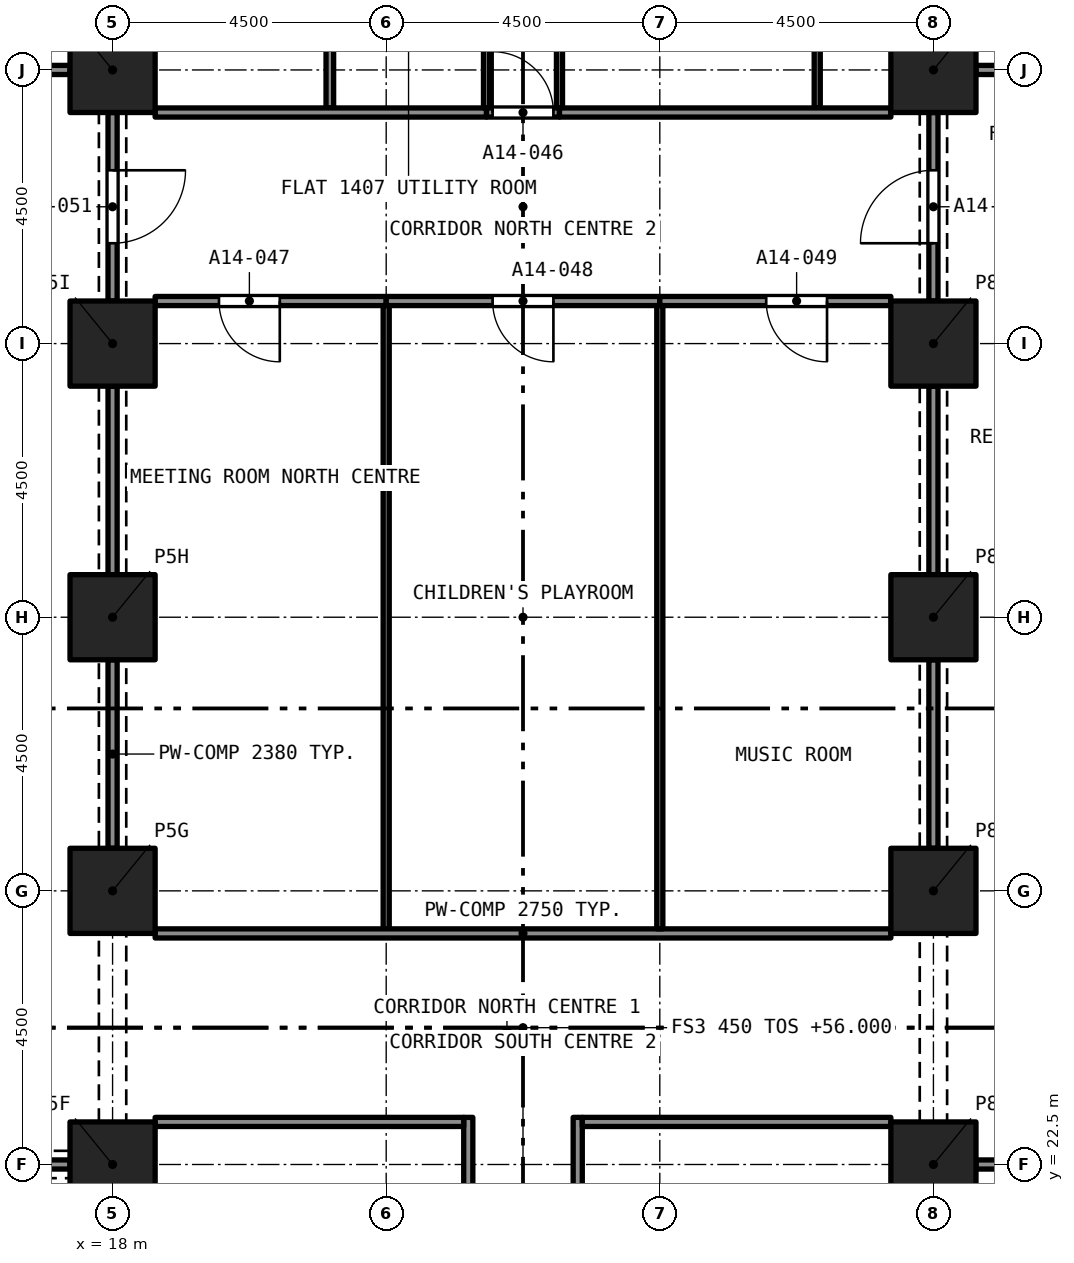
"""IFC4 building model, lengths in metres.
Left out: names, types, materials, properties, quantities, classifications, styles, units other than length and angle.
Written with IfcOpenShell. Run it as: python <this file> out.ifc"""

import sys

from ifc_helpers import new_model, si_unit, direction, frame, frame_2d, origin, origin_2d, place, context, subcontext, project, spatial, rectangle, extrude, element, fill, save


model = new_model("IFC4")
c1 = context("Model", 3, precision=1e-05, world=origin(), true_north=direction((0.0, 1.0)))
c2 = subcontext(c1, "Body", "Model", "MODEL_VIEW")
j1 = project(units=[si_unit("LENGTHUNIT", "METRE"), si_unit("PLANEANGLEUNIT", "RADIAN")], contexts=[c1])
p1 = place(None, origin())
s1 = spatial("IfcSite", under=j1, at=p1, CompositionType="ELEMENT")
p2 = place(p1, origin())
s2 = spatial("IfcBuilding", under=s1, at=p2, CompositionType="ELEMENT")
p3 = place(p2, frame((0.0, 0.0, 56.0)))
s3 = spatial("IfcBuildingStorey", under=s2, at=p3, CompositionType="ELEMENT", Elevation=56.0)
for number, where, z_axis, x_axis in (
    (1, (18.0, 22.5, 0.0), (0.0, 0.0, 1.0), (1.0, 0.0, 0.0)),
    (2, (31.5, 22.5, 0.0), (0.0, 0.0, 1.0), (1.0, 0.0, 0.0)),
    (3, (18.0, 27.0, 0.0), (0.0, 0.0, 1.0), (1.0, 0.0, 0.0)),
    (4, (31.5, 27.0, 0.0), (0.0, 0.0, 1.0), (1.0, 0.0, 0.0)),
    (5, (18.0, 31.5, 0.0), (0.0, 0.0, 1.0), (1.0, 0.0, 0.0)),
    (6, (31.5, 31.5, 0.0), (0.0, 0.0, 1.0), (1.0, 0.0, 0.0)),
    (7, (18.0, 36.0, 0.0), (0.0, 0.0, 1.0), (1.0, 0.0, 0.0)),
    (8, (31.5, 36.0, 0.0), (0.0, 0.0, 1.0), (1.0, 0.0, 0.0)),
    (9, (18.0, 40.5, 0.0), (0.0, 0.0, 1.0), (1.0, 0.0, 0.0)),
    (10, (31.5, 40.5, 0.0), (0.0, 0.0, 1.0), (1.0, 0.0, 0.0)),
):
    element("IfcColumn", number, at=place(p3, frame(where, z_axis=z_axis, x_axis=x_axis)), inside=s3, PredefinedType="COLUMN", context=c2, shape_type="SweptSolid", body=[
        extrude(rectangle(XDim=1.4, YDim=1.4, at=origin_2d()), origin(), (0.0, 0.0, 1.0), 3.2),
    ])
p4 = place(p3, frame((13.5, 40.5, 0.0), z_axis=(0.0, 0.0, 1.0), x_axis=(1.0, 0.0, 0.0)))
e11 = element("IfcWall", 11, at=p4, inside=s3, PredefinedType="PARTITIONING", context=c2, shape_type="SweptSolid", body=[
    extrude(rectangle(XDim=3.8, YDim=0.15, at=frame_2d((1.9, 0.0))), origin(), (0.0, 0.0, 1.0), 2.9),
])
p5 = place(p3, frame((32.2, 40.5, 0.0), z_axis=(0.0, 0.0, 1.0), x_axis=(1.0, 0.0, 0.0)))
e12 = element("IfcWall", 12, at=p5, inside=s3, PredefinedType="PARTITIONING", context=c2, shape_type="SweptSolid", body=[
    extrude(rectangle(XDim=2.15, YDim=0.15, at=frame_2d((1.075, 0.0))), origin(), (0.0, 0.0, 1.0), 2.9),
])
p6 = place(p5, frame((1.02, 0.0, 0.0)))
e13 = element("IfcOpeningElement", 13, at=p6, cuts=e12, PredefinedType="OPENING", context=c2, shape_type="SweptSolid", body=[
    extrude(rectangle(XDim=1.0, YDim=2.1, at=frame_2d((0.5, 1.05))), frame((0.0, 0.085, 0.0), z_axis=(0.0, -1.0, 0.0), x_axis=(1.0, 0.0, 0.0)), (0.0, 0.0, 1.0), 0.17),
])
p7 = place(p3, frame((21.573, 39.875, 0.0), z_axis=(0.0, 0.0, 1.0), x_axis=(0.0, 1.0, 0.0)))
e14 = element("IfcWall", 14, at=p7, inside=s3, PredefinedType="PARTITIONING", context=c2, shape_type="SweptSolid", body=[
    extrude(rectangle(XDim=3.843, YDim=0.125, at=frame_2d((1.921, 0.0))), origin(), (0.0, 0.0, 1.0), 2.75),
])
p8 = place(p3, frame((18.7, 39.8, 0.0), z_axis=(0.0, 0.0, 1.0), x_axis=(1.0, 0.0, 0.0)))
e15 = element("IfcWall", 15, at=p8, inside=s3, PredefinedType="PARTITIONING", context=c2, shape_type="SweptSolid", body=[
    extrude(rectangle(XDim=5.45, YDim=0.15, at=frame_2d((2.725, 0.0))), origin(), (0.0, 0.0, 1.0), 2.75),
])
for number, where, z_axis, x_axis in (
    (16, (25.35, 39.875, 0.0), (0.0, 0.0, 1.0), (0.0, 1.0, 0.0)),
    (17, (24.15, 39.875, 0.0), (0.0, 0.0, 1.0), (0.0, 1.0, 0.0)),
):
    element("IfcWall", number, at=place(p3, frame(where, z_axis=z_axis, x_axis=x_axis)), inside=s3, PredefinedType="PARTITIONING", context=c2, shape_type="SweptSolid", body=[
        extrude(rectangle(XDim=3.855, YDim=0.1, at=frame_2d((1.927, 0.0))), origin(), (0.0, 0.0, 1.0), 2.75),
    ])
p9 = place(p3, frame((24.15, 39.8, 0.0), z_axis=(0.0, 0.0, 1.0), x_axis=(1.0, 0.0, 0.0)))
e18 = element("IfcWall", 18, at=p9, inside=s3, PredefinedType="PARTITIONING", context=c2, shape_type="SweptSolid", body=[
    extrude(rectangle(XDim=1.2, YDim=0.15, at=frame_2d((0.6, 0.0))), origin(), (0.0, 0.0, 1.0), 2.75),
])
p10 = place(p9, frame((0.1, 0.0, 0.0)))
e19 = element("IfcOpeningElement", 19, at=p10, cuts=e18, PredefinedType="OPENING", context=c2, shape_type="SweptSolid", body=[
    extrude(rectangle(XDim=1.0, YDim=2.1, at=frame_2d((0.5, 1.05))), frame((0.0, 0.085, 0.0), z_axis=(0.0, -1.0, 0.0), x_axis=(1.0, 0.0, 0.0)), (0.0, 0.0, 1.0), 0.17),
])
p11 = place(p3, frame((29.589, 39.875, 0.0), z_axis=(0.0, 0.0, 1.0), x_axis=(0.0, 1.0, 0.0)))
e20 = element("IfcWall", 20, at=p11, inside=s3, PredefinedType="PARTITIONING", context=c2, shape_type="SweptSolid", body=[
    extrude(rectangle(XDim=3.855, YDim=0.1, at=frame_2d((1.927, 0.0))), origin(), (0.0, 0.0, 1.0), 2.75),
])
p12 = place(p3, frame((25.35, 39.8, 0.0), z_axis=(0.0, 0.0, 1.0), x_axis=(1.0, 0.0, 0.0)))
e21 = element("IfcWall", 21, at=p12, inside=s3, PredefinedType="PARTITIONING", context=c2, shape_type="SweptSolid", body=[
    extrude(rectangle(XDim=5.45, YDim=0.15, at=frame_2d((2.725, 0.0))), origin(), (0.0, 0.0, 1.0), 2.75),
])
p13 = place(p3, frame((22.5, 36.7, 0.0), z_axis=(0.0, 0.0, 1.0), x_axis=(-1.0, 0.0, 0.0)))
e22 = element("IfcWall", 22, at=p13, inside=s3, PredefinedType="PARTITIONING", context=c2, shape_type="SweptSolid", body=[
    extrude(rectangle(XDim=3.8, YDim=0.15, at=frame_2d((1.9, 0.0))), origin(), (0.0, 0.0, 1.0), 2.75),
])
p14 = place(p13, frame((1.75, 0.0, 0.0)))
e23 = element("IfcOpeningElement", 23, at=p14, cuts=e22, PredefinedType="OPENING", context=c2, shape_type="SweptSolid", body=[
    extrude(rectangle(XDim=1.0, YDim=2.1, at=frame_2d((0.5, 1.05))), frame((0.0, 0.085, 0.0), z_axis=(0.0, -1.0, 0.0), x_axis=(1.0, 0.0, 0.0)), (0.0, 0.0, 1.0), 0.17),
])
p15 = place(p3, frame((27.0, 36.7, 0.0), z_axis=(0.0, 0.0, 1.0), x_axis=(-1.0, 0.0, 0.0)))
e24 = element("IfcWall", 24, at=p15, inside=s3, PredefinedType="PARTITIONING", context=c2, shape_type="SweptSolid", body=[
    extrude(rectangle(XDim=4.5, YDim=0.15, at=frame_2d((2.25, 0.0))), origin(), (0.0, 0.0, 1.0), 2.75),
])
p16 = place(p15, frame((1.75, 0.0, 0.0)))
e25 = element("IfcOpeningElement", 25, at=p16, cuts=e24, PredefinedType="OPENING", context=c2, shape_type="SweptSolid", body=[
    extrude(rectangle(XDim=1.0, YDim=2.1, at=frame_2d((0.5, 1.05))), frame((0.0, 0.085, 0.0), z_axis=(0.0, -1.0, 0.0), x_axis=(1.0, 0.0, 0.0)), (0.0, 0.0, 1.0), 0.17),
])
p17 = place(p3, frame((30.8, 36.7, 0.0), z_axis=(0.0, 0.0, 1.0), x_axis=(-1.0, 0.0, 0.0)))
e26 = element("IfcWall", 26, at=p17, inside=s3, PredefinedType="PARTITIONING", context=c2, shape_type="SweptSolid", body=[
    extrude(rectangle(XDim=3.8, YDim=0.15, at=frame_2d((1.9, 0.0))), origin(), (0.0, 0.0, 1.0), 2.75),
])
p18 = place(p17, frame((1.05, 0.0, 0.0)))
e27 = element("IfcOpeningElement", 27, at=p18, cuts=e26, PredefinedType="OPENING", context=c2, shape_type="SweptSolid", body=[
    extrude(rectangle(XDim=1.0, YDim=2.1, at=frame_2d((0.5, 1.05))), frame((0.0, 0.085, 0.0), z_axis=(0.0, -1.0, 0.0), x_axis=(1.0, 0.0, 0.0)), (0.0, 0.0, 1.0), 0.17),
])
p19 = place(p3, frame((31.5, 36.7, 0.0), z_axis=(0.0, 0.0, 1.0), x_axis=(0.0, 1.0, 0.0)))
e28 = element("IfcWall", 28, at=p19, inside=s3, PredefinedType="PARTITIONING", context=c2, shape_type="SweptSolid", body=[
    extrude(rectangle(XDim=3.1, YDim=0.15, at=frame_2d((1.55, 0.0))), origin(), (0.0, 0.0, 1.0), 2.38),
])
p20 = place(p19, frame((0.95, 0.0, 0.0)))
e29 = element("IfcOpeningElement", 29, at=p20, cuts=e28, PredefinedType="OPENING", context=c2, shape_type="SweptSolid", body=[
    extrude(rectangle(XDim=1.2, YDim=2.1, at=frame_2d((0.6, 1.05))), frame((0.0, 0.085, 0.0), z_axis=(0.0, -1.0, 0.0), x_axis=(1.0, 0.0, 0.0)), (0.0, 0.0, 1.0), 0.17),
])
p21 = place(p3, frame((18.0, 39.8, 0.0), z_axis=(0.0, 0.0, 1.0), x_axis=(0.0, -1.0, 0.0)))
e30 = element("IfcWall", 30, at=p21, inside=s3, PredefinedType="PARTITIONING", context=c2, shape_type="SweptSolid", body=[
    extrude(rectangle(XDim=3.1, YDim=0.15, at=frame_2d((1.55, 0.0))), origin(), (0.0, 0.0, 1.0), 2.38),
])
p22 = place(p21, frame((0.95, 0.0, 0.0)))
e31 = element("IfcOpeningElement", 31, at=p22, cuts=e30, PredefinedType="OPENING", context=c2, shape_type="SweptSolid", body=[
    extrude(rectangle(XDim=1.2, YDim=2.1, at=frame_2d((0.6, 1.05))), frame((0.0, 0.085, 0.0), z_axis=(0.0, -1.0, 0.0), x_axis=(1.0, 0.0, 0.0)), (0.0, 0.0, 1.0), 0.17),
])
p23 = place(p3, frame((23.85, 17.225, 0.0), z_axis=(0.0, 0.0, 1.0), x_axis=(0.0, 1.0, 0.0)))
e32 = element("IfcWall", 32, at=p23, inside=s3, PredefinedType="PARTITIONING", context=c2, shape_type="SweptSolid", body=[
    extrude(rectangle(XDim=6.05, YDim=0.15, at=frame_2d((3.025, 0.0))), origin(), (0.0, 0.0, 1.0), 2.75),
])
p24 = place(p23, frame((2.525, 0.0, 0.0)))
e33 = element("IfcOpeningElement", 33, at=p24, cuts=e32, PredefinedType="OPENING", context=c2, shape_type="SweptSolid", body=[
    extrude(rectangle(XDim=1.0, YDim=2.1, at=frame_2d((0.5, 1.05))), frame((0.0, 0.085, 0.0), z_axis=(0.0, -1.0, 0.0), x_axis=(1.0, 0.0, 0.0)), (0.0, 0.0, 1.0), 0.17),
])
p25 = place(p3, frame((25.65, 23.275, 0.0), z_axis=(0.0, 0.0, 1.0), x_axis=(0.0, -1.0, 0.0)))
e34 = element("IfcWall", 34, at=p25, inside=s3, PredefinedType="PARTITIONING", context=c2, shape_type="SweptSolid", body=[
    extrude(rectangle(XDim=6.05, YDim=0.15, at=frame_2d((3.025, 0.0))), origin(), (0.0, 0.0, 1.0), 2.75),
])
p26 = place(p25, frame((2.525, 0.0, 0.0)))
e35 = element("IfcOpeningElement", 35, at=p26, cuts=e34, PredefinedType="OPENING", context=c2, shape_type="SweptSolid", body=[
    extrude(rectangle(XDim=1.0, YDim=2.1, at=frame_2d((0.5, 1.05))), frame((0.0, 0.085, 0.0), z_axis=(0.0, -1.0, 0.0), x_axis=(1.0, 0.0, 0.0)), (0.0, 0.0, 1.0), 0.17),
])
p27 = place(p3, frame((22.5, 26.375, 0.0), z_axis=(0.0, 0.0, 1.0), x_axis=(0.0, 1.0, 0.0)))
e36 = element("IfcWall", 36, at=p27, inside=s3, PredefinedType="PARTITIONING", context=c2, shape_type="SweptSolid", body=[
    extrude(rectangle(XDim=10.25, YDim=0.1, at=frame_2d((5.125, 0.0))), origin(), (0.0, 0.0, 1.0), 2.75),
])
for number, where, z_axis, x_axis in (
    (37, (18.0, 27.7, 0.0), (0.0, 0.0, 1.0), (0.0, 1.0, 0.0)),
    (38, (18.0, 32.2, 0.0), (0.0, 0.0, 1.0), (0.0, 1.0, 0.0)),
):
    element("IfcWall", number, at=place(p3, frame(where, z_axis=z_axis, x_axis=x_axis)), inside=s3, PredefinedType="PARTITIONING", context=c2, shape_type="SweptSolid", body=[
        extrude(rectangle(XDim=3.1, YDim=0.15, at=frame_2d((1.55, 0.0))), origin(), (0.0, 0.0, 1.0), 2.38),
    ])
p28 = place(p3, frame((18.7, 26.3, 0.0), z_axis=(0.0, 0.0, 1.0), x_axis=(1.0, 0.0, 0.0)))
e39 = element("IfcWall", 39, at=p28, inside=s3, PredefinedType="PARTITIONING", context=c2, shape_type="SweptSolid", body=[
    extrude(rectangle(XDim=12.1, YDim=0.15, at=frame_2d((6.05, 0.0))), origin(), (0.0, 0.0, 1.0), 2.75),
])
p29 = place(p3, frame((27.0, 26.375, 0.0), z_axis=(0.0, 0.0, 1.0), x_axis=(0.0, 1.0, 0.0)))
e40 = element("IfcWall", 40, at=p29, inside=s3, PredefinedType="PARTITIONING", context=c2, shape_type="SweptSolid", body=[
    extrude(rectangle(XDim=10.25, YDim=0.1, at=frame_2d((5.125, 0.0))), origin(), (0.0, 0.0, 1.0), 2.75),
])
for number, where, z_axis, x_axis in (
    (41, (31.5, 32.2, 0.0), (0.0, 0.0, 1.0), (0.0, 1.0, 0.0)),
    (42, (31.5, 27.7, 0.0), (0.0, 0.0, 1.0), (0.0, 1.0, 0.0)),
):
    element("IfcWall", number, at=place(p3, frame(where, z_axis=z_axis, x_axis=x_axis)), inside=s3, PredefinedType="PARTITIONING", context=c2, shape_type="SweptSolid", body=[
        extrude(rectangle(XDim=3.1, YDim=0.15, at=frame_2d((1.55, 0.0))), origin(), (0.0, 0.0, 1.0), 2.38),
    ])
for number, where, z_axis, x_axis in (
    (43, (18.7, 23.2, 0.0), (0.0, 0.0, 1.0), (1.0, 0.0, 0.0)),
    (44, (25.725, 23.2, 0.0), (0.0, 0.0, 1.0), (1.0, 0.0, 0.0)),
):
    element("IfcWall", number, at=place(p3, frame(where, z_axis=z_axis, x_axis=x_axis)), inside=s3, PredefinedType="PARTITIONING", context=c2, shape_type="SweptSolid", body=[
        extrude(rectangle(XDim=5.075, YDim=0.15, at=frame_2d((2.538, 0.0))), origin(), (0.0, 0.0, 1.0), 2.75),
    ])
p30 = place(p3, frame((32.2, 22.5, 0.0), z_axis=(0.0, 0.0, 1.0), x_axis=(1.0, 0.0, 0.0)))
e45 = element("IfcWall", 45, at=p30, inside=s3, PredefinedType="PARTITIONING", context=c2, shape_type="SweptSolid", body=[
    extrude(rectangle(XDim=9.725, YDim=0.15, at=frame_2d((4.863, 0.0))), origin(), (0.0, 0.0, 1.0), 2.9),
])
p31 = place(p3, frame((14.2, 22.5, 0.0), z_axis=(0.0, 0.0, 1.0), x_axis=(1.0, 0.0, 0.0)))
e46 = element("IfcWall", 46, at=p31, inside=s3, PredefinedType="PARTITIONING", context=c2, shape_type="SweptSolid", body=[
    extrude(rectangle(XDim=3.1, YDim=0.15, at=frame_2d((1.55, 0.0))), origin(), (0.0, 0.0, 1.0), 2.38),
])
p32 = place(p10, origin())
e47 = element("IfcDoor", 47, at=p32, inside=s3, OperationType="SINGLE_SWING_RIGHT", PredefinedType="DOOR", context=c2, shape_type="SweptSolid", body=[
    extrude(rectangle(XDim=1.0, YDim=2.1, at=frame_2d((0.5, 1.05))), frame((0.0, 0.025, 0.0), z_axis=(0.0, -1.0, 0.0), x_axis=(1.0, 0.0, 0.0)), (0.0, 0.0, 1.0), 0.05),
])
fill(e19, e47)
p33 = place(p14, origin())
e48 = element("IfcDoor", 48, at=p33, inside=s3, OperationType="SINGLE_SWING_RIGHT", PredefinedType="DOOR", context=c2, shape_type="SweptSolid", body=[
    extrude(rectangle(XDim=1.0, YDim=2.1, at=frame_2d((0.5, 1.05))), frame((0.0, 0.025, 0.0), z_axis=(0.0, -1.0, 0.0), x_axis=(1.0, 0.0, 0.0)), (0.0, 0.0, 1.0), 0.05),
])
fill(e23, e48)
p34 = place(p16, origin())
e49 = element("IfcDoor", 49, at=p34, inside=s3, OperationType="SINGLE_SWING_RIGHT", PredefinedType="DOOR", context=c2, shape_type="SweptSolid", body=[
    extrude(rectangle(XDim=1.0, YDim=2.1, at=frame_2d((0.5, 1.05))), frame((0.0, 0.025, 0.0), z_axis=(0.0, -1.0, 0.0), x_axis=(1.0, 0.0, 0.0)), (0.0, 0.0, 1.0), 0.05),
])
fill(e25, e49)
p35 = place(p18, origin())
e50 = element("IfcDoor", 50, at=p35, inside=s3, OperationType="SINGLE_SWING_LEFT", PredefinedType="DOOR", context=c2, shape_type="SweptSolid", body=[
    extrude(rectangle(XDim=1.0, YDim=2.1, at=frame_2d((0.5, 1.05))), frame((0.0, 0.025, 0.0), z_axis=(0.0, -1.0, 0.0), x_axis=(1.0, 0.0, 0.0)), (0.0, 0.0, 1.0), 0.05),
])
fill(e27, e50)
p36 = place(p20, origin())
e51 = element("IfcDoor", 51, at=p36, inside=s3, OperationType="SINGLE_SWING_LEFT", PredefinedType="DOOR", context=c2, shape_type="SweptSolid", body=[
    extrude(rectangle(XDim=1.2, YDim=2.1, at=frame_2d((0.6, 1.05))), frame((0.0, 0.025, 0.0), z_axis=(0.0, -1.0, 0.0), x_axis=(1.0, 0.0, 0.0)), (0.0, 0.0, 1.0), 0.05),
])
fill(e29, e51)
p37 = place(p22, origin())
e52 = element("IfcDoor", 52, at=p37, inside=s3, OperationType="SINGLE_SWING_LEFT", PredefinedType="DOOR", context=c2, shape_type="SweptSolid", body=[
    extrude(rectangle(XDim=1.2, YDim=2.1, at=frame_2d((0.6, 1.05))), frame((0.0, 0.025, 0.0), z_axis=(0.0, -1.0, 0.0), x_axis=(1.0, 0.0, 0.0)), (0.0, 0.0, 1.0), 0.05),
])
fill(e31, e52)
save(model, sys.argv[1])
